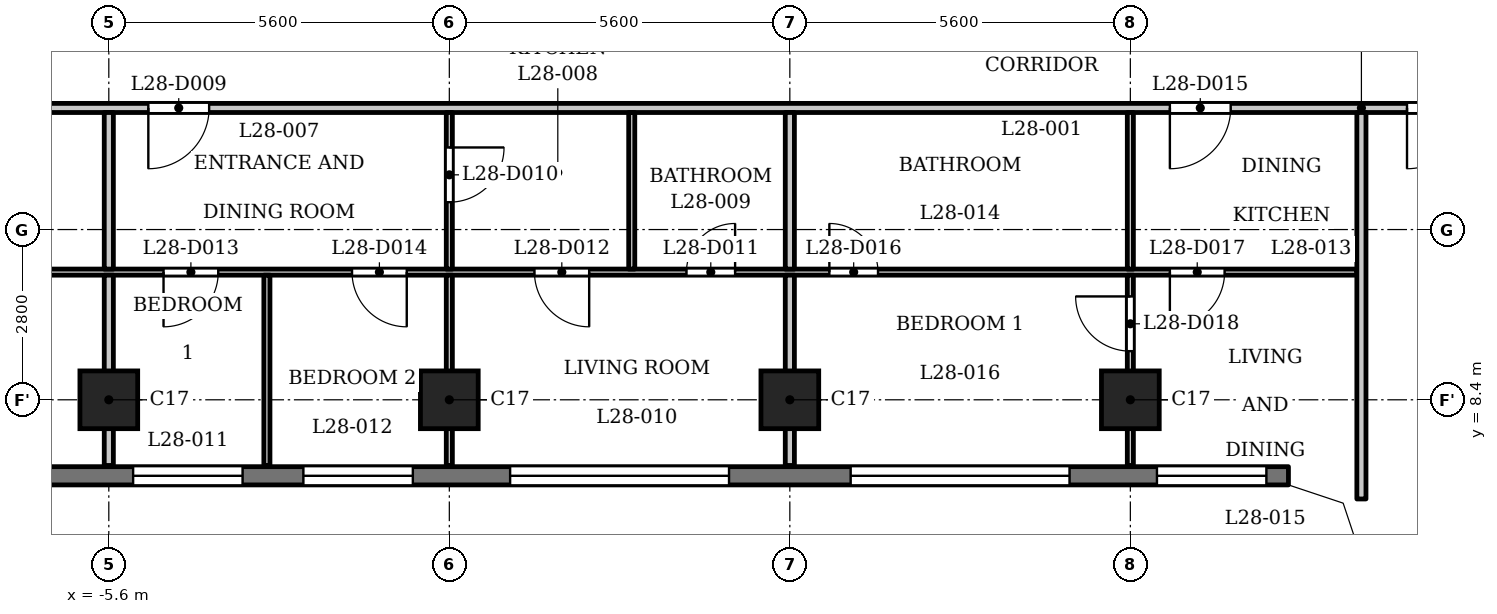
"""IFC4 building model, lengths in metres.
Left out: names, types, materials, properties, quantities, classifications, styles, units other than length and angle.
Written with IfcOpenShell. Run it as: python <this file> out.ifc"""

import sys

from ifc_helpers import new_model, si_unit, direction, frame, frame_2d, origin, origin_2d, place, context, subcontext, project, spatial, polyline, rectangle, outline, extrude, element, fill, save


model = new_model("IFC4")
c1 = context("Model", 3, precision=1e-05, world=origin(), true_north=direction((0.0, 1.0)))
c2 = subcontext(c1, "Body", "Model", "MODEL_VIEW")
j1 = project(units=[si_unit("LENGTHUNIT", "METRE"), si_unit("PLANEANGLEUNIT", "RADIAN")], contexts=[c1])
p1 = place(None, origin())
s1 = spatial("IfcSite", under=j1, at=p1, CompositionType="ELEMENT")
p2 = place(p1, origin())
s2 = spatial("IfcBuilding", under=s1, at=p2, CompositionType="ELEMENT")
p3 = place(p2, frame((0.0, 0.0, 111.3)))
s3 = spatial("IfcBuildingStorey", under=s2, at=p3, CompositionType="ELEMENT", Elevation=111.3)
for number, where, z_axis, x_axis in (
    (1, (-5.6, 8.4, 0.0), (0.0, 0.0, 1.0), (1.0, 0.0, 0.0)),
    (2, (0.0, 8.4, 0.0), (0.0, 0.0, 1.0), (1.0, 0.0, 0.0)),
    (3, (5.6, 8.4, 0.0), (0.0, 0.0, 1.0), (1.0, 0.0, 0.0)),
    (4, (11.2, 8.4, 0.0), (0.0, 0.0, 1.0), (1.0, 0.0, 0.0)),
):
    element("IfcColumn", number, at=place(p3, frame(where, z_axis=z_axis, x_axis=x_axis)), inside=s3, PredefinedType="COLUMN", context=c2, shape_type="SweptSolid", body=[
        extrude(rectangle(XDim=0.95, YDim=0.95, at=origin_2d()), origin(), (0.0, 0.0, 1.0), 3.5),
    ])
p4 = place(p3, frame((-13.8, 7.15, 0.0), z_axis=(0.0, 0.0, 1.0), x_axis=(1.0, 0.0, 0.0)))
e5 = element("IfcWall", 5, at=p4, inside=s3, PredefinedType="SOLIDWALL", context=c2, shape_type="SweptSolid", body=[
    extrude(rectangle(XDim=27.6, YDim=0.3, at=frame_2d((13.8, 0.0))), origin(), (0.0, 0.0, 1.0), 3.2),
])
p5 = place(p4, frame((0.363, 0.0, 0.9)))
e6 = element("IfcOpeningElement", 6, at=p5, cuts=e5, PredefinedType="OPENING", context=c2, shape_type="SweptSolid", body=[
    extrude(rectangle(XDim=1.8, YDim=1.25, at=frame_2d((0.9, 0.625))), frame((0.0, 0.16, 0.0), z_axis=(0.0, -1.0, 0.0), x_axis=(1.0, 0.0, 0.0)), (0.0, 0.0, 1.0), 0.32),
])
p6 = place(p4, frame((3.6, 0.0, 1.2)))
e7 = element("IfcOpeningElement", 7, at=p6, cuts=e5, PredefinedType="OPENING", context=c2, shape_type="SweptSolid", body=[
    extrude(rectangle(XDim=3.6, YDim=0.95, at=frame_2d((1.8, 0.475))), frame((0.0, 0.16, 0.0), z_axis=(0.0, -1.0, 0.0), x_axis=(1.0, 0.0, 0.0)), (0.0, 0.0, 1.0), 0.32),
])
p7 = place(p4, frame((8.6, 0.0, 0.9)))
e8 = element("IfcOpeningElement", 8, at=p7, cuts=e5, PredefinedType="OPENING", context=c2, shape_type="SweptSolid", body=[
    extrude(rectangle(XDim=1.8, YDim=1.25, at=frame_2d((0.9, 0.625))), frame((0.0, 0.16, 0.0), z_axis=(0.0, -1.0, 0.0), x_axis=(1.0, 0.0, 0.0)), (0.0, 0.0, 1.0), 0.32),
])
p8 = place(p4, frame((11.4, 0.0, 0.9)))
e9 = element("IfcOpeningElement", 9, at=p8, cuts=e5, PredefinedType="OPENING", context=c2, shape_type="SweptSolid", body=[
    extrude(rectangle(XDim=1.8, YDim=1.25, at=frame_2d((0.9, 0.625))), frame((0.0, 0.16, 0.0), z_axis=(0.0, -1.0, 0.0), x_axis=(1.0, 0.0, 0.0)), (0.0, 0.0, 1.0), 0.32),
])
p9 = place(p4, frame((14.8, 0.0, 1.2)))
e10 = element("IfcOpeningElement", 10, at=p9, cuts=e5, PredefinedType="OPENING", context=c2, shape_type="SweptSolid", body=[
    extrude(rectangle(XDim=3.6, YDim=0.95, at=frame_2d((1.8, 0.475))), frame((0.0, 0.16, 0.0), z_axis=(0.0, -1.0, 0.0), x_axis=(1.0, 0.0, 0.0)), (0.0, 0.0, 1.0), 0.32),
])
p10 = place(p4, frame((20.4, 0.0, 1.2)))
e11 = element("IfcOpeningElement", 11, at=p10, cuts=e5, PredefinedType="OPENING", context=c2, shape_type="SweptSolid", body=[
    extrude(rectangle(XDim=3.6, YDim=0.95, at=frame_2d((1.8, 0.475))), frame((0.0, 0.16, 0.0), z_axis=(0.0, -1.0, 0.0), x_axis=(1.0, 0.0, 0.0)), (0.0, 0.0, 1.0), 0.32),
])
p11 = place(p4, frame((25.438, 0.0, 0.9)))
e12 = element("IfcOpeningElement", 12, at=p11, cuts=e5, PredefinedType="OPENING", context=c2, shape_type="SweptSolid", body=[
    extrude(rectangle(XDim=1.8, YDim=1.25, at=frame_2d((0.9, 0.625))), frame((0.0, 0.16, 0.0), z_axis=(0.0, -1.0, 0.0), x_axis=(1.0, 0.0, 0.0)), (0.0, 0.0, 1.0), 0.32),
])
p12 = place(p3, frame((-14.925, 10.5, 0.0), z_axis=(0.0, 0.0, 1.0), x_axis=(1.0, 0.0, 0.0)))
e13 = element("IfcWall", 13, at=p12, inside=s3, PredefinedType="PARTITIONING", context=c2, shape_type="SweptSolid", body=[
    extrude(rectangle(XDim=29.85, YDim=0.1, at=frame_2d((14.925, 0.0))), origin(), (0.0, 0.0, 1.0), 3.2),
])
p13 = place(p12, frame((0.525, 0.0, 0.0)))
e14 = element("IfcOpeningElement", 14, at=p13, cuts=e13, PredefinedType="OPENING", context=c2, shape_type="SweptSolid", body=[
    extrude(rectangle(XDim=0.8, YDim=2.1, at=frame_2d((0.4, 1.05))), frame((0.0, 0.06, 0.0), z_axis=(0.0, -1.0, 0.0), x_axis=(1.0, 0.0, 0.0)), (0.0, 0.0, 1.0), 0.12),
])
p14 = place(p12, frame((4.375, 0.0, 0.0)))
e15 = element("IfcOpeningElement", 15, at=p14, cuts=e13, PredefinedType="OPENING", context=c2, shape_type="SweptSolid", body=[
    extrude(rectangle(XDim=0.9, YDim=2.1, at=frame_2d((0.45, 1.05))), frame((0.0, 0.06, 0.0), z_axis=(0.0, -1.0, 0.0), x_axis=(1.0, 0.0, 0.0)), (0.0, 0.0, 1.0), 0.12),
])
p15 = place(p12, frame((18.825, 0.0, 0.0)))
e16 = element("IfcOpeningElement", 16, at=p15, cuts=e13, PredefinedType="OPENING", context=c2, shape_type="SweptSolid", body=[
    extrude(rectangle(XDim=0.8, YDim=2.1, at=frame_2d((0.4, 1.05))), frame((0.0, 0.06, 0.0), z_axis=(0.0, -1.0, 0.0), x_axis=(1.0, 0.0, 0.0)), (0.0, 0.0, 1.0), 0.12),
])
p16 = place(p12, frame((16.325, 0.0, 0.0)))
e17 = element("IfcOpeningElement", 17, at=p16, cuts=e13, PredefinedType="OPENING", context=c2, shape_type="SweptSolid", body=[
    extrude(rectangle(XDim=0.9, YDim=2.1, at=frame_2d((0.45, 1.05))), frame((0.0, 0.06, 0.0), z_axis=(0.0, -1.0, 0.0), x_axis=(1.0, 0.0, 0.0)), (0.0, 0.0, 1.0), 0.12),
])
p17 = place(p12, frame((10.225, 0.0, 0.0)))
e18 = element("IfcOpeningElement", 18, at=p17, cuts=e13, PredefinedType="OPENING", context=c2, shape_type="SweptSolid", body=[
    extrude(rectangle(XDim=0.9, YDim=2.1, at=frame_2d((0.45, 1.05))), frame((0.0, 0.06, 0.0), z_axis=(0.0, -1.0, 0.0), x_axis=(1.0, 0.0, 0.0)), (0.0, 0.0, 1.0), 0.12),
])
p18 = place(p12, frame((13.325, 0.0, 0.0)))
e19 = element("IfcOpeningElement", 19, at=p18, cuts=e13, PredefinedType="OPENING", context=c2, shape_type="SweptSolid", body=[
    extrude(rectangle(XDim=0.9, YDim=2.1, at=frame_2d((0.45, 1.05))), frame((0.0, 0.06, 0.0), z_axis=(0.0, -1.0, 0.0), x_axis=(1.0, 0.0, 0.0)), (0.0, 0.0, 1.0), 0.12),
])
p19 = place(p12, frame((21.175, 0.0, 0.0)))
e20 = element("IfcOpeningElement", 20, at=p19, cuts=e13, PredefinedType="OPENING", context=c2, shape_type="SweptSolid", body=[
    extrude(rectangle(XDim=0.8, YDim=2.1, at=frame_2d((0.4, 1.05))), frame((0.0, 0.06, 0.0), z_axis=(0.0, -1.0, 0.0), x_axis=(1.0, 0.0, 0.0)), (0.0, 0.0, 1.0), 0.12),
])
p20 = place(p12, frame((26.775, 0.0, 0.0)))
e21 = element("IfcOpeningElement", 21, at=p20, cuts=e13, PredefinedType="OPENING", context=c2, shape_type="SweptSolid", body=[
    extrude(rectangle(XDim=0.9, YDim=2.1, at=frame_2d((0.45, 1.05))), frame((0.0, 0.06, 0.0), z_axis=(0.0, -1.0, 0.0), x_axis=(1.0, 0.0, 0.0)), (0.0, 0.0, 1.0), 0.12),
])
p21 = place(p3, frame((-17.4, 13.2, 0.0), z_axis=(0.0, 0.0, 1.0), x_axis=(1.0, 0.0, 0.0)))
e22 = element("IfcWall", 22, at=p21, inside=s3, PredefinedType="PARTITIONING", context=c2, shape_type="SweptSolid", body=[
    extrude(rectangle(XDim=34.8, YDim=0.15, at=frame_2d((17.4, 0.0))), origin(), (0.0, 0.0, 1.0), 3.2),
])
p22 = place(p21, frame((0.75, 0.0, 0.0)))
e23 = element("IfcOpeningElement", 23, at=p22, cuts=e22, PredefinedType="OPENING", context=c2, shape_type="SweptSolid", body=[
    extrude(rectangle(XDim=1.0, YDim=2.1, at=frame_2d((0.5, 1.05))), frame((0.0, 0.085, 0.0), z_axis=(0.0, -1.0, 0.0), x_axis=(1.0, 0.0, 0.0)), (0.0, 0.0, 1.0), 0.17),
])
p23 = place(p21, frame((33.15, 0.0, 0.0)))
e24 = element("IfcOpeningElement", 24, at=p23, cuts=e22, PredefinedType="OPENING", context=c2, shape_type="SweptSolid", body=[
    extrude(rectangle(XDim=1.0, YDim=2.1, at=frame_2d((0.5, 1.05))), frame((0.0, 0.085, 0.0), z_axis=(0.0, -1.0, 0.0), x_axis=(1.0, 0.0, 0.0)), (0.0, 0.0, 1.0), 0.17),
])
p24 = place(p21, frame((6.85, 0.0, 0.0)))
e25 = element("IfcOpeningElement", 25, at=p24, cuts=e22, PredefinedType="OPENING", context=c2, shape_type="SweptSolid", body=[
    extrude(rectangle(XDim=1.0, YDim=2.1, at=frame_2d((0.5, 1.05))), frame((0.0, 0.085, 0.0), z_axis=(0.0, -1.0, 0.0), x_axis=(1.0, 0.0, 0.0)), (0.0, 0.0, 1.0), 0.17),
])
p25 = place(p21, frame((12.45, 0.0, 0.0)))
e26 = element("IfcOpeningElement", 26, at=p25, cuts=e22, PredefinedType="OPENING", context=c2, shape_type="SweptSolid", body=[
    extrude(rectangle(XDim=1.0, YDim=2.1, at=frame_2d((0.5, 1.05))), frame((0.0, 0.085, 0.0), z_axis=(0.0, -1.0, 0.0), x_axis=(1.0, 0.0, 0.0)), (0.0, 0.0, 1.0), 0.17),
])
p26 = place(p21, frame((29.25, 0.0, 0.0)))
e27 = element("IfcOpeningElement", 27, at=p26, cuts=e22, PredefinedType="OPENING", context=c2, shape_type="SweptSolid", body=[
    extrude(rectangle(XDim=1.0, YDim=2.1, at=frame_2d((0.5, 1.05))), frame((0.0, 0.085, 0.0), z_axis=(0.0, -1.0, 0.0), x_axis=(1.0, 0.0, 0.0)), (0.0, 0.0, 1.0), 0.17),
])
p27 = place(p3, frame((-5.6, 7.32, 0.0), z_axis=(0.0, 0.0, 1.0), x_axis=(0.0, 1.0, 0.0)))
e28 = element("IfcWall", 28, at=p27, inside=s3, PredefinedType="PARTITIONING", context=c2, shape_type="SweptSolid", body=[
    extrude(rectangle(XDim=3.13, YDim=0.15, at=frame_2d((1.565, 0.0))), origin(), (0.0, 0.0, 1.0), 3.2),
])
p28 = place(p3, frame((-5.6, 10.55, 0.0), z_axis=(0.0, 0.0, 1.0), x_axis=(0.0, 1.0, 0.0)))
e29 = element("IfcWall", 29, at=p28, inside=s3, PredefinedType="PARTITIONING", context=c2, shape_type="SweptSolid", body=[
    extrude(rectangle(XDim=2.575, YDim=0.15, at=frame_2d((1.288, 0.0))), origin(), (0.0, 0.0, 1.0), 3.2),
])
for number, where, z_axis, x_axis in (
    (30, (-3.0, 7.32, 0.0), (0.0, 0.0, 1.0), (0.0, 1.0, 0.0)),
    (31, (0.0, 7.32, 0.0), (0.0, 0.0, 1.0), (0.0, 1.0, 0.0)),
):
    element("IfcWall", number, at=place(p3, frame(where, z_axis=z_axis, x_axis=x_axis)), inside=s3, PredefinedType="PARTITIONING", context=c2, shape_type="SweptSolid", body=[
        extrude(rectangle(XDim=3.13, YDim=0.1, at=frame_2d((1.565, 0.0))), origin(), (0.0, 0.0, 1.0), 3.2),
    ])
p29 = place(p3, frame((0.0, 10.55, 0.0), z_axis=(0.0, 0.0, 1.0), x_axis=(0.0, 1.0, 0.0)))
e32 = element("IfcWall", 32, at=p29, inside=s3, PredefinedType="PARTITIONING", context=c2, shape_type="SweptSolid", body=[
    extrude(rectangle(XDim=2.575, YDim=0.1, at=frame_2d((1.288, 0.0))), origin(), (0.0, 0.0, 1.0), 3.2),
])
p30 = place(p29, frame((1.1, 0.0, 0.0)))
e33 = element("IfcOpeningElement", 33, at=p30, cuts=e32, PredefinedType="OPENING", context=c2, shape_type="SweptSolid", body=[
    extrude(rectangle(XDim=0.9, YDim=2.1, at=frame_2d((0.45, 1.05))), frame((0.0, 0.06, 0.0), z_axis=(0.0, -1.0, 0.0), x_axis=(1.0, 0.0, 0.0)), (0.0, 0.0, 1.0), 0.12),
])
p31 = place(p3, frame((3.0, 10.55, 0.0), z_axis=(0.0, 0.0, 1.0), x_axis=(0.0, 1.0, 0.0)))
e34 = element("IfcWall", 34, at=p31, inside=s3, PredefinedType="PARTITIONING", context=c2, shape_type="SweptSolid", body=[
    extrude(rectangle(XDim=2.575, YDim=0.1, at=frame_2d((1.288, 0.0))), origin(), (0.0, 0.0, 1.0), 3.2),
])
p32 = place(p3, frame((5.6, 7.32, 0.0), z_axis=(0.0, 0.0, 1.0), x_axis=(0.0, 1.0, 0.0)))
e35 = element("IfcWall", 35, at=p32, inside=s3, PredefinedType="PARTITIONING", context=c2, shape_type="SweptSolid", body=[
    extrude(rectangle(XDim=3.13, YDim=0.15, at=frame_2d((1.565, 0.0))), origin(), (0.0, 0.0, 1.0), 3.2),
])
p33 = place(p3, frame((5.6, 10.55, 0.0), z_axis=(0.0, 0.0, 1.0), x_axis=(0.0, 1.0, 0.0)))
e36 = element("IfcWall", 36, at=p33, inside=s3, PredefinedType="PARTITIONING", context=c2, shape_type="SweptSolid", body=[
    extrude(rectangle(XDim=2.575, YDim=0.15, at=frame_2d((1.288, 0.0))), origin(), (0.0, 0.0, 1.0), 3.2),
])
p34 = place(p3, frame((11.2, 7.32, 0.0), z_axis=(0.0, 0.0, 1.0), x_axis=(0.0, 1.0, 0.0)))
e37 = element("IfcWall", 37, at=p34, inside=s3, PredefinedType="PARTITIONING", context=c2, shape_type="SweptSolid", body=[
    extrude(rectangle(XDim=3.13, YDim=0.1, at=frame_2d((1.565, 0.0))), origin(), (0.0, 0.0, 1.0), 3.2),
])
p35 = place(p34, frame((1.88, 0.0, 0.0)))
e38 = element("IfcOpeningElement", 38, at=p35, cuts=e37, PredefinedType="OPENING", context=c2, shape_type="SweptSolid", body=[
    extrude(rectangle(XDim=0.9, YDim=2.1, at=frame_2d((0.45, 1.05))), frame((0.0, 0.06, 0.0), z_axis=(0.0, -1.0, 0.0), x_axis=(1.0, 0.0, 0.0)), (0.0, 0.0, 1.0), 0.12),
])
p36 = place(p3, frame((11.2, 10.55, 0.0), z_axis=(0.0, 0.0, 1.0), x_axis=(0.0, 1.0, 0.0)))
e39 = element("IfcWall", 39, at=p36, inside=s3, PredefinedType="PARTITIONING", context=c2, shape_type="SweptSolid", body=[
    extrude(rectangle(XDim=2.575, YDim=0.1, at=frame_2d((1.288, 0.0))), origin(), (0.0, 0.0, 1.0), 3.2),
])
p37 = place(p3, frame((15.0, 6.769, 0.0), z_axis=(0.0, 0.0, 1.0), x_axis=(0.0, 1.0, 0.0)))
e40 = element("IfcWall", 40, at=p37, inside=s3, PredefinedType="PARTITIONING", context=c2, shape_type="SweptSolid", body=[
    extrude(rectangle(XDim=6.356, YDim=0.15, at=frame_2d((3.178, 0.0))), origin(), (0.0, 0.0, 1.0), 3.2),
])
p38 = place(p3, origin())
e41 = element("IfcWall", 41, at=p38, inside=s3, PredefinedType="SOLIDWALL", context=c2, shape_type="SweptSolid", body=[
    extrude(outline(polyline([(14.937, 6.937), (13.849, 7.3), (13.8, 7.3), (13.8, 7.0), (14.7, 6.7), (15.0, 5.8), (15.3, 5.8), (15.3, 5.849), (14.937, 6.937)])), origin(), (0.0, 0.0, 1.0), 3.2),
])
p39 = place(p23, origin())
e42 = element("IfcDoor", 42, at=p39, inside=s3, OperationType="SINGLE_SWING_LEFT", PredefinedType="DOOR", context=c2, shape_type="SweptSolid", body=[
    extrude(rectangle(XDim=1.0, YDim=2.1, at=frame_2d((0.5, 1.05))), frame((0.0, 0.025, 0.0), z_axis=(0.0, -1.0, 0.0), x_axis=(1.0, 0.0, 0.0)), (0.0, 0.0, 1.0), 0.05),
])
fill(e24, e42)
p40 = place(p25, origin())
e43 = element("IfcDoor", 43, at=p40, inside=s3, OperationType="SINGLE_SWING_LEFT", PredefinedType="DOOR", context=c2, shape_type="SweptSolid", body=[
    extrude(rectangle(XDim=1.0, YDim=2.1, at=frame_2d((0.5, 1.05))), frame((0.0, 0.025, 0.0), z_axis=(0.0, -1.0, 0.0), x_axis=(1.0, 0.0, 0.0)), (0.0, 0.0, 1.0), 0.05),
])
fill(e26, e43)
p41 = place(p30, origin())
e44 = element("IfcDoor", 44, at=p41, inside=s3, OperationType="SINGLE_SWING_RIGHT", PredefinedType="DOOR", context=c2, shape_type="SweptSolid", body=[
    extrude(rectangle(XDim=0.9, YDim=2.1, at=frame_2d((0.45, 1.05))), frame((0.0, 0.025, 0.0), z_axis=(0.0, -1.0, 0.0), x_axis=(1.0, 0.0, 0.0)), (0.0, 0.0, 1.0), 0.05),
])
fill(e33, e44)
p42 = place(p15, origin())
e45 = element("IfcDoor", 45, at=p42, inside=s3, OperationType="SINGLE_SWING_LEFT", PredefinedType="DOOR", context=c2, shape_type="SweptSolid", body=[
    extrude(rectangle(XDim=0.8, YDim=2.1, at=frame_2d((0.4, 1.05))), frame((0.0, 0.025, 0.0), z_axis=(0.0, -1.0, 0.0), x_axis=(1.0, 0.0, 0.0)), (0.0, 0.0, 1.0), 0.05),
])
fill(e16, e45)
p43 = place(p16, origin())
e46 = element("IfcDoor", 46, at=p43, inside=s3, OperationType="SINGLE_SWING_RIGHT", PredefinedType="DOOR", context=c2, shape_type="SweptSolid", body=[
    extrude(rectangle(XDim=0.9, YDim=2.1, at=frame_2d((0.45, 1.05))), frame((0.0, 0.025, 0.0), z_axis=(0.0, -1.0, 0.0), x_axis=(1.0, 0.0, 0.0)), (0.0, 0.0, 1.0), 0.05),
])
fill(e17, e46)
p44 = place(p17, origin())
e47 = element("IfcDoor", 47, at=p44, inside=s3, OperationType="SINGLE_SWING_LEFT", PredefinedType="DOOR", context=c2, shape_type="SweptSolid", body=[
    extrude(rectangle(XDim=0.9, YDim=2.1, at=frame_2d((0.45, 1.05))), frame((0.0, 0.025, 0.0), z_axis=(0.0, -1.0, 0.0), x_axis=(1.0, 0.0, 0.0)), (0.0, 0.0, 1.0), 0.05),
])
fill(e18, e47)
p45 = place(p18, origin())
e48 = element("IfcDoor", 48, at=p45, inside=s3, OperationType="SINGLE_SWING_RIGHT", PredefinedType="DOOR", context=c2, shape_type="SweptSolid", body=[
    extrude(rectangle(XDim=0.9, YDim=2.1, at=frame_2d((0.45, 1.05))), frame((0.0, 0.025, 0.0), z_axis=(0.0, -1.0, 0.0), x_axis=(1.0, 0.0, 0.0)), (0.0, 0.0, 1.0), 0.05),
])
fill(e19, e48)
p46 = place(p26, origin())
e49 = element("IfcDoor", 49, at=p46, inside=s3, OperationType="SINGLE_SWING_LEFT", PredefinedType="DOOR", context=c2, shape_type="SweptSolid", body=[
    extrude(rectangle(XDim=1.0, YDim=2.1, at=frame_2d((0.5, 1.05))), frame((0.0, 0.025, 0.0), z_axis=(0.0, -1.0, 0.0), x_axis=(1.0, 0.0, 0.0)), (0.0, 0.0, 1.0), 0.05),
])
fill(e27, e49)
p47 = place(p19, origin())
e50 = element("IfcDoor", 50, at=p47, inside=s3, OperationType="SINGLE_SWING_RIGHT", PredefinedType="DOOR", context=c2, shape_type="SweptSolid", body=[
    extrude(rectangle(XDim=0.8, YDim=2.1, at=frame_2d((0.4, 1.05))), frame((0.0, 0.025, 0.0), z_axis=(0.0, -1.0, 0.0), x_axis=(1.0, 0.0, 0.0)), (0.0, 0.0, 1.0), 0.05),
])
fill(e20, e50)
p48 = place(p20, origin())
e51 = element("IfcDoor", 51, at=p48, inside=s3, OperationType="SINGLE_SWING_LEFT", PredefinedType="DOOR", context=c2, shape_type="SweptSolid", body=[
    extrude(rectangle(XDim=0.9, YDim=2.1, at=frame_2d((0.45, 1.05))), frame((0.0, 0.025, 0.0), z_axis=(0.0, -1.0, 0.0), x_axis=(1.0, 0.0, 0.0)), (0.0, 0.0, 1.0), 0.05),
])
fill(e21, e51)
p49 = place(p35, origin())
e52 = element("IfcDoor", 52, at=p49, inside=s3, OperationType="SINGLE_SWING_LEFT", PredefinedType="DOOR", context=c2, shape_type="SweptSolid", body=[
    extrude(rectangle(XDim=0.9, YDim=2.1, at=frame_2d((0.45, 1.05))), frame((0.0, 0.025, 0.0), z_axis=(0.0, -1.0, 0.0), x_axis=(1.0, 0.0, 0.0)), (0.0, 0.0, 1.0), 0.05),
])
fill(e38, e52)
p50 = place(p7, origin())
e53 = element("IfcWindow", 53, at=p50, inside=s3, PartitioningType="SINGLE_PANEL", PredefinedType="WINDOW", context=c2, shape_type="SweptSolid", body=[
    extrude(rectangle(XDim=1.8, YDim=1.25, at=frame_2d((0.9, 0.625))), frame((0.0, 0.03, 0.0), z_axis=(0.0, -1.0, 0.0), x_axis=(1.0, 0.0, 0.0)), (0.0, 0.0, 1.0), 0.06),
])
fill(e8, e53)
p51 = place(p8, origin())
e54 = element("IfcWindow", 54, at=p51, inside=s3, PartitioningType="SINGLE_PANEL", PredefinedType="WINDOW", context=c2, shape_type="SweptSolid", body=[
    extrude(rectangle(XDim=1.8, YDim=1.25, at=frame_2d((0.9, 0.625))), frame((0.0, 0.03, 0.0), z_axis=(0.0, -1.0, 0.0), x_axis=(1.0, 0.0, 0.0)), (0.0, 0.0, 1.0), 0.06),
])
fill(e9, e54)
p52 = place(p9, origin())
e55 = element("IfcWindow", 55, at=p52, inside=s3, PartitioningType="SINGLE_PANEL", PredefinedType="WINDOW", context=c2, shape_type="SweptSolid", body=[
    extrude(rectangle(XDim=3.6, YDim=0.95, at=frame_2d((1.8, 0.475))), frame((0.0, 0.03, 0.0), z_axis=(0.0, -1.0, 0.0), x_axis=(1.0, 0.0, 0.0)), (0.0, 0.0, 1.0), 0.06),
])
fill(e10, e55)
p53 = place(p10, origin())
e56 = element("IfcWindow", 56, at=p53, inside=s3, PartitioningType="SINGLE_PANEL", PredefinedType="WINDOW", context=c2, shape_type="SweptSolid", body=[
    extrude(rectangle(XDim=3.6, YDim=0.95, at=frame_2d((1.8, 0.475))), frame((0.0, 0.03, 0.0), z_axis=(0.0, -1.0, 0.0), x_axis=(1.0, 0.0, 0.0)), (0.0, 0.0, 1.0), 0.06),
])
fill(e11, e56)
p54 = place(p11, origin())
e57 = element("IfcWindow", 57, at=p54, inside=s3, PartitioningType="SINGLE_PANEL", PredefinedType="WINDOW", context=c2, shape_type="SweptSolid", body=[
    extrude(rectangle(XDim=1.8, YDim=1.25, at=frame_2d((0.9, 0.625))), frame((0.0, 0.03, 0.0), z_axis=(0.0, -1.0, 0.0), x_axis=(1.0, 0.0, 0.0)), (0.0, 0.0, 1.0), 0.06),
])
fill(e12, e57)
save(model, sys.argv[1])
